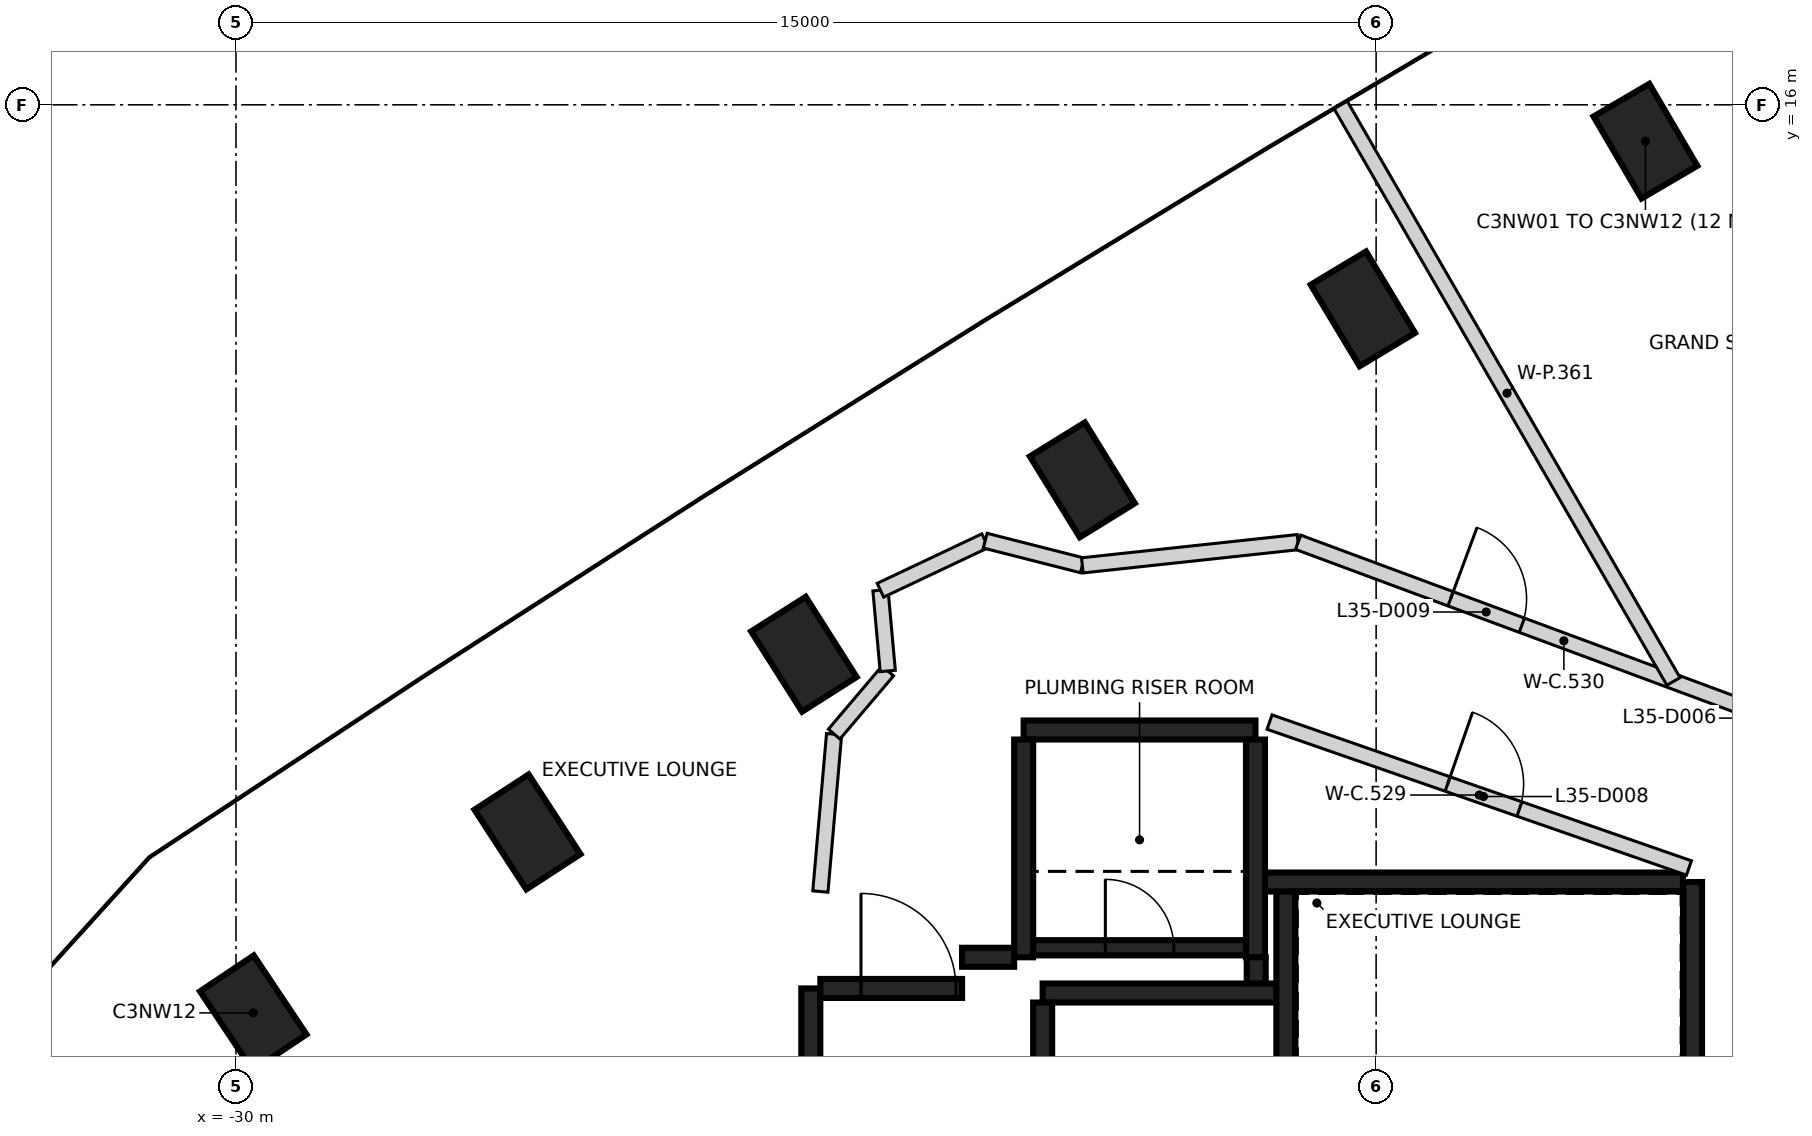
"""IFC4 building model, lengths in metres.
Left out: names, types, materials, properties, quantities, classifications, styles, units other than length and angle.
Written with IfcOpenShell. Run it as: python <this file> out.ifc"""

import sys

from ifc_helpers import new_model, si_unit, direction, frame, frame_2d, origin, origin_2d, place, context, subcontext, project, spatial, rectangle, extrude, element, fill, save


model = new_model("IFC4")
c1 = context("Model", 3, precision=1e-05, world=origin(), true_north=direction((0.0, 1.0)))
c2 = subcontext(c1, "Body", "Model", "MODEL_VIEW")
j1 = project(units=[si_unit("LENGTHUNIT", "METRE"), si_unit("PLANEANGLEUNIT", "RADIAN")], contexts=[c1])
p1 = place(None, origin())
s1 = spatial("IfcSite", under=j1, at=p1, CompositionType="ELEMENT")
p2 = place(p1, origin())
s2 = spatial("IfcBuilding", under=s1, at=p2, CompositionType="ELEMENT")
p3 = place(p2, frame((0.0, 0.0, 143.2)))
s3 = spatial("IfcBuildingStorey", under=s2, at=p3, CompositionType="ELEMENT", Elevation=143.2)
for number, where, z_axis, x_axis in (
    (1, (-11.457, 15.522, -0.4), (0.0, 0.0, 1.0), (-0.505, 0.863, 0.0)),
    (2, (-15.175, 13.316, -0.4), (0.0, 0.0, 1.0), (-0.515, 0.857, 0.0)),
    (3, (-18.865, 11.066, -0.4), (0.0, 0.0, 1.0), (-0.526, 0.851, 0.0)),
    (4, (-22.529, 8.772, -0.4), (0.0, 0.0, 1.0), (-0.536, 0.844, 0.0)),
    (5, (-26.165, 6.434, -0.4), (0.0, 0.0, 1.0), (-0.546, 0.838, 0.0)),
    (6, (-29.773, 4.053, -0.4), (0.0, 0.0, 1.0), (-0.556, 0.831, 0.0)),
):
    element("IfcColumn", number, at=place(p3, frame(where, z_axis=z_axis, x_axis=x_axis)), inside=s3, PredefinedType="COLUMN", context=c2, shape_type="SweptSolid", body=[
        extrude(rectangle(XDim=1.25, YDim=0.85, at=origin_2d()), origin(), (0.0, 0.0, 1.0), 3.6),
    ])
p4 = place(p3, frame((-10.837, 5.775, 0.0), z_axis=(0.0, 0.0, 1.0), x_axis=(0.0, -1.0, 0.0)))
e7 = element("IfcWall", 7, at=p4, inside=s3, PredefinedType="SHEAR", context=c2, shape_type="SweptSolid", body=[
    extrude(rectangle(XDim=11.55, YDim=0.25, at=frame_2d((5.775, 0.0))), origin(), (0.0, 0.0, 1.0), 3.2),
])
p5 = place(p4, frame((10.025, 0.0, 0.0)))
e8 = element("IfcOpeningElement", 8, at=p5, cuts=e7, PredefinedType="OPENING", context=c2, shape_type="SweptSolid", body=[
    extrude(rectangle(XDim=1.2, YDim=2.1, at=frame_2d((0.6, 1.05))), frame((0.0, 0.135, 0.0), z_axis=(0.0, -1.0, 0.0), x_axis=(1.0, 0.0, 0.0)), (0.0, 0.0, 1.0), 0.27),
])
p6 = place(p4, frame((8.725, 0.0, 0.0)))
e9 = element("IfcOpeningElement", 9, at=p6, cuts=e7, PredefinedType="OPENING", context=c2, shape_type="SweptSolid", body=[
    extrude(rectangle(XDim=1.2, YDim=2.1, at=frame_2d((0.6, 1.05))), frame((0.0, 0.135, 0.0), z_axis=(0.0, -1.0, 0.0), x_axis=(1.0, 0.0, 0.0)), (0.0, 0.0, 1.0), 0.27),
])
p7 = place(p3, frame((-16.472, 5.775, 0.0), z_axis=(0.0, 0.0, 1.0), x_axis=(1.0, 0.0, 0.0)))
e10 = element("IfcWall", 10, at=p7, inside=s3, PredefinedType="SHEAR", context=c2, shape_type="SweptSolid", body=[
    extrude(rectangle(XDim=5.51, YDim=0.25, at=frame_2d((2.755, 0.0))), origin(), (0.0, 0.0, 1.0), 3.2),
])
p8 = place(p3, frame((-19.637, 7.775, 0.0), z_axis=(0.0, 0.0, 1.0), x_axis=(1.0, 0.0, 0.0)))
e11 = element("IfcWall", 11, at=p8, inside=s3, PredefinedType="SHEAR", context=c2, shape_type="SweptSolid", body=[
    extrude(rectangle(XDim=3.05, YDim=0.25, at=frame_2d((1.525, 0.0))), origin(), (0.0, 0.0, 1.0), 3.2),
])
for number, where, z_axis, x_axis in (
    (12, (-16.587, 7.65, 0.0), (0.0, 0.0, 1.0), (0.0, -1.0, 0.0)),
    (13, (-19.637, 4.785, 0.0), (0.0, 0.0, 1.0), (0.0, 1.0, 0.0)),
):
    element("IfcWall", number, at=place(p3, frame(where, z_axis=z_axis, x_axis=x_axis)), inside=s3, PredefinedType="SHEAR", context=c2, shape_type="SweptSolid", body=[
        extrude(rectangle(XDim=2.865, YDim=0.25, at=frame_2d((1.432, 0.0))), origin(), (0.0, 0.0, 1.0), 3.2),
    ])
p9 = place(p3, frame((-16.302, 4.315, 0.0), z_axis=(0.0, 0.0, 1.0), x_axis=(-1.0, 0.0, 0.0)))
e14 = element("IfcWall", 14, at=p9, inside=s3, PredefinedType="SHEAR", context=c2, shape_type="SweptSolid", body=[
    extrude(rectangle(XDim=3.085, YDim=0.25, at=frame_2d((1.542, 0.0))), origin(), (0.0, 0.0, 1.0), 3.2),
])
p10 = place(p3, frame((-16.187, 3.2, 0.0), z_axis=(0.0, 0.0, 1.0), x_axis=(0.0, 1.0, 0.0)))
e15 = element("IfcWall", 15, at=p10, inside=s3, PredefinedType="SHEAR", context=c2, shape_type="SweptSolid", body=[
    extrude(rectangle(XDim=2.449, YDim=0.25, at=frame_2d((1.225, 0.0))), origin(), (0.0, 0.0, 1.0), 3.2),
])
p11 = place(p3, frame((-22.437, 2.4, 0.0), z_axis=(0.0, 0.0, 1.0), x_axis=(0.0, 1.0, 0.0)))
e16 = element("IfcWall", 16, at=p11, inside=s3, PredefinedType="SHEAR", context=c2, shape_type="SweptSolid", body=[
    extrude(rectangle(XDim=1.975, YDim=0.25, at=frame_2d((0.987, 0.0))), origin(), (0.0, 0.0, 1.0), 3.2),
])
p12 = place(p3, frame((-22.312, 4.375, 0.0), z_axis=(0.0, 0.0, 1.0), x_axis=(1.0, 0.0, 0.0)))
e17 = element("IfcWall", 17, at=p12, inside=s3, PredefinedType="SHEAR", context=c2, shape_type="SweptSolid", body=[
    extrude(rectangle(XDim=1.865, YDim=0.25, at=frame_2d((0.932, 0.0))), origin(), (0.0, 0.0, 1.0), 3.2),
])
p13 = place(p12, frame((0.535, 0.0, 0.0)))
e18 = element("IfcOpeningElement", 18, at=p13, cuts=e17, PredefinedType="OPENING", context=c2, shape_type="SweptSolid", body=[
    extrude(rectangle(XDim=1.25, YDim=2.1, at=frame_2d((0.625, 1.05))), frame((0.0, 0.135, 0.0), z_axis=(0.0, -1.0, 0.0), x_axis=(1.0, 0.0, 0.0)), (0.0, 0.0, 1.0), 0.27),
])
p14 = place(p3, frame((-19.387, 4.19, 0.0), z_axis=(0.0, 0.0, 1.0), x_axis=(0.0, -1.0, 0.0)))
e19 = element("IfcWall", 19, at=p14, inside=s3, PredefinedType="SHEAR", context=c2, shape_type="SweptSolid", body=[
    extrude(rectangle(XDim=0.989, YDim=0.25, at=frame_2d((0.495, 0.0))), origin(), (0.0, 0.0, 1.0), 3.2),
])
p15 = place(p3, frame((-20.447, 4.785, 0.0), z_axis=(0.0, 0.0, 1.0), x_axis=(1.0, 0.0, 0.0)))
e20 = element("IfcWall", 20, at=p15, inside=s3, PredefinedType="SHEAR", context=c2, shape_type="SweptSolid", body=[
    extrude(rectangle(XDim=0.685, YDim=0.25, at=frame_2d((0.342, 0.0))), origin(), (0.0, 0.0, 1.0), 3.2),
])
p16 = place(p3, frame((-16.577, 4.785, 0.0), z_axis=(0.0, 0.0, 1.0), x_axis=(0.0, -1.0, 0.0)))
e21 = element("IfcWall", 21, at=p16, inside=s3, PredefinedType="SHEAR", context=c2, shape_type="SweptSolid", body=[
    extrude(rectangle(XDim=0.344, YDim=0.25, at=frame_2d((0.172, 0.0))), origin(), (0.0, 0.0, 1.0), 3.2),
])
p17 = place(p3, frame((-19.511, 4.91, 0.0), z_axis=(0.0, 0.0, 1.0), x_axis=(1.0, 0.0, 0.0)))
e22 = element("IfcWall", 22, at=p17, inside=s3, PredefinedType="SHEAR", context=c2, shape_type="SweptSolid", body=[
    extrude(rectangle(XDim=2.798, YDim=0.2, at=frame_2d((1.399, 0.0))), origin(), (0.0, 0.0, 1.0), 3.2),
])
p18 = place(p17, frame((0.949, 0.0, 0.0)))
e23 = element("IfcOpeningElement", 23, at=p18, cuts=e22, PredefinedType="OPENING", context=c2, shape_type="SweptSolid", body=[
    extrude(rectangle(XDim=0.9, YDim=2.1, at=frame_2d((0.45, 1.05))), frame((0.0, 0.11, 0.0), z_axis=(0.0, -1.0, 0.0), x_axis=(1.0, 0.0, 0.0)), (0.0, 0.0, 1.0), 0.22),
])
p19 = place(p3, frame((-22.131, 7.72, 0.0), z_axis=(0.0, 0.0, 1.0), x_axis=(-0.086827346826, -0.996223374471, 0.0)))
e24 = element("IfcWall", 24, at=p19, inside=s3, PredefinedType="PARTITIONING", context=c2, shape_type="SweptSolid", body=[
    extrude(rectangle(XDim=2.078, YDim=0.2, at=frame_2d((1.039, 0.0))), origin(), (0.0, 0.0, 1.0), 3.2),
])
p20 = place(p3, frame((-22.13, 7.721, 0.0), z_axis=(0.0, 0.0, 1.0), x_axis=(0.646815590698, 0.762646439466, 0.0)))
e25 = element("IfcWall", 25, at=p20, inside=s3, PredefinedType="PARTITIONING", context=c2, shape_type="SweptSolid", body=[
    extrude(rectangle(XDim=1.09, YDim=0.2, at=frame_2d((0.545, 0.0))), origin(), (0.0, 0.0, 1.0), 3.2),
])
p21 = place(p3, frame((-21.521, 9.614, 0.0), z_axis=(0.0, 0.0, 1.0), x_axis=(0.089978363699, -0.995943720331, 0.0)))
e26 = element("IfcWall", 26, at=p21, inside=s3, PredefinedType="PARTITIONING", context=c2, shape_type="SweptSolid", body=[
    extrude(rectangle(XDim=1.066, YDim=0.2, at=frame_2d((0.533, 0.0))), origin(), (0.0, 0.0, 1.0), 2.3),
])
p22 = place(p3, frame((-21.521, 9.614, 0.0), z_axis=(0.0, 0.0, 1.0), x_axis=(0.904083527367, 0.427355795028, 0.0)))
e27 = element("IfcWall", 27, at=p22, inside=s3, PredefinedType="PARTITIONING", context=c2, shape_type="SweptSolid", body=[
    extrude(rectangle(XDim=1.523, YDim=0.2, at=frame_2d((0.761, 0.0))), origin(), (0.0, 0.0, 1.0), 2.3),
])
p23 = place(p3, frame((-20.143, 10.266, 0.0), z_axis=(0.0, 0.0, 1.0), x_axis=(0.969121308325, -0.246584447505, 0.0)))
e28 = element("IfcWall", 28, at=p23, inside=s3, PredefinedType="PARTITIONING", context=c2, shape_type="SweptSolid", body=[
    extrude(rectangle(XDim=1.319, YDim=0.2, at=frame_2d((0.659, 0.0))), origin(), (0.0, 0.0, 1.0), 2.3),
])
p24 = place(p3, frame((-18.865, 9.941, 0.0), z_axis=(0.0, 0.0, 1.0), x_axis=(0.99423123086, 0.107257911519, 0.0)))
e29 = element("IfcWall", 29, at=p24, inside=s3, PredefinedType="PARTITIONING", context=c2, shape_type="SweptSolid", body=[
    extrude(rectangle(XDim=2.854, YDim=0.2, at=frame_2d((1.427, 0.0))), origin(), (0.0, 0.0, 1.0), 3.2),
])
p25 = place(p3, frame((-16.402, 7.879, 0.0), z_axis=(0.0, 0.0, 1.0), x_axis=(0.94449961557, -0.328512520596, 0.0)))
e30 = element("IfcWall", 30, at=p25, inside=s3, PredefinedType="PARTITIONING", context=c2, shape_type="SweptSolid", body=[
    extrude(rectangle(XDim=5.842, YDim=0.2, at=frame_2d((2.921, 0.0))), origin(), (0.0, 0.0, 1.0), 3.2),
])
p26 = place(p25, frame((2.481, 0.0, 0.0)))
e31 = element("IfcOpeningElement", 31, at=p26, cuts=e30, PredefinedType="OPENING", context=c2, shape_type="SweptSolid", body=[
    extrude(rectangle(XDim=1.0, YDim=2.1, at=frame_2d((0.5, 1.05))), frame((0.0, 0.11, 0.0), z_axis=(0.0, -1.0, 0.0), x_axis=(1.0, 0.0, 0.0)), (0.0, 0.0, 1.0), 0.22),
])
p27 = place(p3, frame((-16.026, 10.245, 0.0), z_axis=(0.0, 0.0, 1.0), x_axis=(0.937607706988, -0.347694963721, 0.0)))
e32 = element("IfcWall", 32, at=p27, inside=s3, PredefinedType="PARTITIONING", context=c2, shape_type="SweptSolid", body=[
    extrude(rectangle(XDim=7.458, YDim=0.2, at=frame_2d((3.729, 0.0))), origin(), (0.0, 0.0, 1.0), 3.2),
])
p28 = place(p27, frame((6.179, 0.0, 0.0)))
e33 = element("IfcOpeningElement", 33, at=p28, cuts=e32, PredefinedType="OPENING", context=c2, shape_type="SweptSolid", body=[
    extrude(rectangle(XDim=0.95, YDim=2.1, at=frame_2d((0.475, 1.05))), frame((0.0, 0.11, 0.0), z_axis=(0.0, -1.0, 0.0), x_axis=(1.0, 0.0, 0.0)), (0.0, 0.0, 1.0), 0.22),
])
p29 = place(p27, frame((2.139, 0.0, 0.0)))
e34 = element("IfcOpeningElement", 34, at=p29, cuts=e32, PredefinedType="OPENING", context=c2, shape_type="SweptSolid", body=[
    extrude(rectangle(XDim=1.0, YDim=2.1, at=frame_2d((0.5, 1.05))), frame((0.0, 0.11, 0.0), z_axis=(0.0, -1.0, 0.0), x_axis=(1.0, 0.0, 0.0)), (0.0, 0.0, 1.0), 0.22),
])
p30 = place(p3, frame((-15.467, 15.998, 0.0), z_axis=(0.0, 0.0, 1.0), x_axis=(0.500003998589, -0.866023095186, 0.0)))
e35 = element("IfcWall", 35, at=p30, inside=s3, PredefinedType="PARTITIONING", context=c2, shape_type="SweptSolid", body=[
    extrude(rectangle(XDim=8.757, YDim=0.2, at=frame_2d((4.379, 0.0))), origin(), (0.0, 0.0, 1.0), 2.3),
])
p31 = place(p3, frame((-10.809, 18.731, 0.0), z_axis=(0.0, 0.0, 1.0), x_axis=(0.500004774777, -0.866022647048, 0.0)))
e36 = element("IfcWall", 36, at=p31, inside=s3, PredefinedType="PARTITIONING", context=c2, shape_type="SweptSolid", body=[
    extrude(rectangle(XDim=12.227, YDim=0.2, at=frame_2d((6.113, 0.0))), origin(), (0.0, 0.0, 1.0), 2.3),
])
p32 = place(p13, origin())
e37 = element("IfcDoor", 37, at=p32, inside=s3, OperationType="SINGLE_SWING_LEFT", PredefinedType="DOOR", context=c2, shape_type="SweptSolid", body=[
    extrude(rectangle(XDim=1.25, YDim=2.1, at=frame_2d((0.625, 1.05))), frame((0.0, 0.025, 0.0), z_axis=(0.0, -1.0, 0.0), x_axis=(1.0, 0.0, 0.0)), (0.0, 0.0, 1.0), 0.05),
])
fill(e18, e37)
p33 = place(p18, origin())
e38 = element("IfcDoor", 38, at=p33, inside=s3, OperationType="SINGLE_SWING_RIGHT", PredefinedType="DOOR", context=c2, shape_type="SweptSolid", body=[
    extrude(rectangle(XDim=0.9, YDim=2.1, at=frame_2d((0.45, 1.05))), frame((0.0, 0.025, 0.0), z_axis=(0.0, -1.0, 0.0), x_axis=(1.0, 0.0, 0.0)), (0.0, 0.0, 1.0), 0.05),
])
fill(e23, e38)
p34 = place(p26, frame((1.0, 0.0, 0.0), z_axis=(0.0, 0.0, 1.0), x_axis=(-1.0, 0.0, 0.0)))
e39 = element("IfcDoor", 39, at=p34, inside=s3, OperationType="SINGLE_SWING_LEFT", PredefinedType="DOOR", context=c2, shape_type="SweptSolid", body=[
    extrude(rectangle(XDim=1.0, YDim=2.1, at=frame_2d((0.5, 1.05))), frame((0.0, 0.025, 0.0), z_axis=(0.0, -1.0, 0.0), x_axis=(1.0, 0.0, 0.0)), (0.0, 0.0, 1.0), 0.05),
])
fill(e31, e39)
p35 = place(p29, frame((1.0, 0.0, 0.0), z_axis=(0.0, 0.0, 1.0), x_axis=(-1.0, 0.0, 0.0)))
e40 = element("IfcDoor", 40, at=p35, inside=s3, OperationType="SINGLE_SWING_LEFT", PredefinedType="DOOR", context=c2, shape_type="SweptSolid", body=[
    extrude(rectangle(XDim=1.0, YDim=2.1, at=frame_2d((0.5, 1.05))), frame((0.0, 0.025, 0.0), z_axis=(0.0, -1.0, 0.0), x_axis=(1.0, 0.0, 0.0)), (0.0, 0.0, 1.0), 0.05),
])
fill(e34, e40)
save(model, sys.argv[1])
